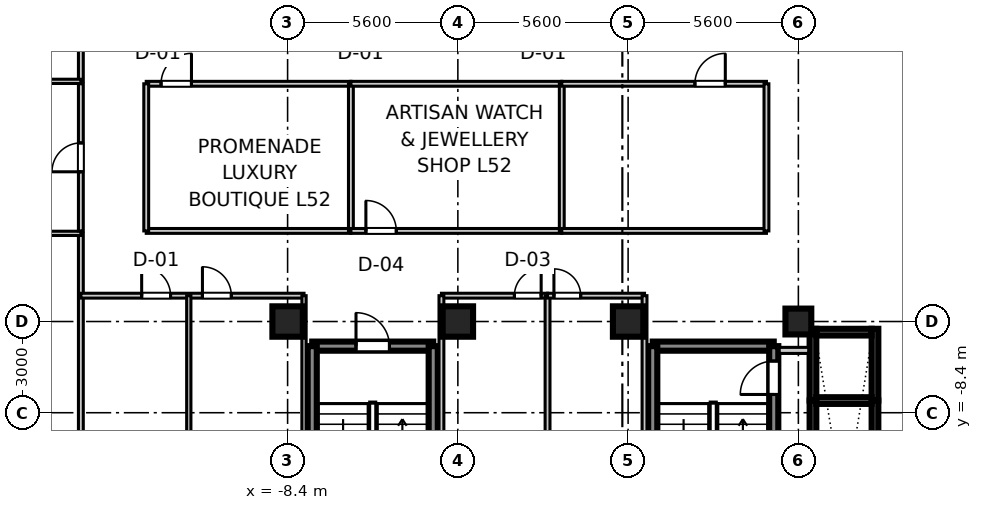
"""IFC4 building model, lengths in metres.
Left out: names, types, materials, properties, quantities, classifications, styles, units other than length and angle.
Written with IfcOpenShell. Run it as: python <this file> out.ifc"""

import sys

from ifc_helpers import new_model, si_unit, direction, frame, frame_2d, origin, origin_2d, place, context, subcontext, project, spatial, rectangle, extrude, source, transform, mapped, element, fill, save


model = new_model("IFC4")
c1 = context("Model", 3, precision=1e-05, world=origin(), true_north=direction((0.0, 1.0)))
c2 = subcontext(c1, "Body", "Model", "MODEL_VIEW")
j1 = project(units=[si_unit("LENGTHUNIT", "METRE"), si_unit("PLANEANGLEUNIT", "RADIAN")], contexts=[c1])
p1 = place(None, origin())
s1 = spatial("IfcSite", under=j1, at=p1, CompositionType="ELEMENT")
p2 = place(p1, origin())
s2 = spatial("IfcBuilding", under=s1, at=p2, CompositionType="ELEMENT")
p3 = place(p2, frame((0.0, 0.0, 204.9)))
s3 = spatial("IfcBuildingStorey", under=s2, at=p3, CompositionType="ELEMENT", Elevation=204.9)
m1 = source(origin(), c2, "Body", "SweptSolid", [
    extrude(rectangle(XDim=1.0, YDim=1.0, at=origin_2d()), origin(), (0.0, 0.0, 1.0), 3.655),
])
for number, where, z_axis, x_axis in (
    (1, (-8.4, -5.4, 0.0), (0.0, 0.0, 1.0), (1.0, 0.0, 0.0)),
    (2, (-2.8, -5.4, 0.0), (0.0, 0.0, 1.0), (1.0, 0.0, 0.0)),
    (3, (2.8, -5.4, 0.0), (0.0, 0.0, 1.0), (1.0, 0.0, 0.0)),
):
    element("IfcColumn", number, at=place(p3, frame(where, z_axis=z_axis, x_axis=x_axis)), inside=s3, PredefinedType="COLUMN", context=c2, shape_type="MappedRepresentation", body=[
        mapped(m1, transform((0.0, 0.0, 0.0), scale=1.0)),
    ])
m2 = source(origin(), c2, "Body", "SweptSolid", [
    extrude(rectangle(XDim=0.85, YDim=0.85, at=origin_2d()), origin(), (0.0, 0.0, 1.0), 3.655),
])
p4 = place(p3, frame((8.4, -5.4, 0.0), z_axis=(0.0, 0.0, 1.0), x_axis=(1.0, 0.0, 0.0)))
e4 = element("IfcColumn", 4, at=p4, inside=s3, PredefinedType="PILASTER", context=c2, shape_type="MappedRepresentation", body=[
    mapped(m2, transform((0.0, 0.0, 0.0), scale=1.0)),
])
m3 = source(origin(), c2, "Body", "SweptSolid", [
    extrude(rectangle(XDim=3.98, YDim=0.3, at=frame_2d((1.99, 0.0))), origin(), (0.0, 0.0, 1.0), 3.41),
])
p5 = place(p3, frame((3.61, -6.21, 0.0), z_axis=(0.0, 0.0, 1.0), x_axis=(1.0, 0.0, 0.0)))
e5 = element("IfcWall", 5, at=p5, inside=s3, PredefinedType="SHEAR", context=c2, shape_type="MappedRepresentation", body=[
    mapped(m3, transform((0.0, 0.0, 0.0), scale=1.0)),
])
m4 = source(origin(), c2, "Body", "SweptSolid", [
    extrude(rectangle(XDim=9.38, YDim=0.3, at=frame_2d((4.69, 0.0))), origin(), (0.0, 0.0, 1.0), 3.41),
])
p6 = place(p3, frame((3.61, -15.59, 0.0), z_axis=(0.0, 0.0, 1.0), x_axis=(0.0, 1.0, 0.0)))
e6 = element("IfcWall", 6, at=p6, inside=s3, PredefinedType="SHEAR", context=c2, shape_type="MappedRepresentation", body=[
    mapped(m4, transform((0.0, 0.0, 0.0), scale=1.0)),
])
p7 = place(p3, frame((7.59, -15.59, 0.0), z_axis=(0.0, 0.0, 1.0), x_axis=(0.0, 1.0, 0.0)))
e7 = element("IfcWall", 7, at=p7, inside=s3, PredefinedType="SHEAR", context=c2, shape_type="MappedRepresentation", body=[
    mapped(m4, transform((0.0, 0.0, 0.0), scale=1.0)),
])
p8 = place(p7, frame((7.79, 0.0, 0.0)))
e8 = element("IfcOpeningElement", 8, at=p8, cuts=e7, PredefinedType="OPENING", context=c2, shape_type="SweptSolid", body=[
    extrude(rectangle(XDim=1.1, YDim=2.15, at=frame_2d((0.55, 1.075))), frame((0.0, 0.16, 0.0), z_axis=(0.0, -1.0, 0.0), x_axis=(1.0, 0.0, 0.0)), (0.0, 0.0, 1.0), 0.32),
])
p9 = place(p3, frame((-7.59, -6.21, 0.0), z_axis=(0.0, 0.0, 1.0), x_axis=(1.0, 0.0, 0.0)))
e9 = element("IfcWall", 9, at=p9, inside=s3, PredefinedType="SHEAR", context=c2, shape_type="MappedRepresentation", body=[
    mapped(m3, transform((0.0, 0.0, 0.0), scale=1.0)),
])
p10 = place(p9, frame((1.44, 0.0, 0.0)))
e10 = element("IfcOpeningElement", 10, at=p10, cuts=e9, PredefinedType="OPENING", context=c2, shape_type="SweptSolid", body=[
    extrude(rectangle(XDim=1.1, YDim=2.15, at=frame_2d((0.55, 1.075))), frame((0.0, 0.16, 0.0), z_axis=(0.0, -1.0, 0.0), x_axis=(1.0, 0.0, 0.0)), (0.0, 0.0, 1.0), 0.32),
])
for number, where, z_axis, x_axis in (
    (11, (-7.59, -15.59, 0.0), (0.0, 0.0, 1.0), (0.0, 1.0, 0.0)),
    (12, (-3.61, -15.59, 0.0), (0.0, 0.0, 1.0), (0.0, 1.0, 0.0)),
):
    element("IfcWall", number, at=place(p3, frame(where, z_axis=z_axis, x_axis=x_axis)), inside=s3, PredefinedType="SHEAR", context=c2, shape_type="MappedRepresentation", body=[
        mapped(m4, transform((0.0, 0.0, 0.0), scale=1.0)),
    ])
m5 = source(origin(), c2, "Body", "SweptSolid", [
    extrude(rectangle(XDim=2.36, YDim=0.22, at=frame_2d((1.18, 0.0))), origin(), (0.0, 0.0, 1.0), 3.41),
])
for number, where, z_axis, x_axis in (
    (13, (8.88, -8.0, 0.0), (0.0, 0.0, 1.0), (0.0, 1.0, 0.0)),
    (14, (10.92, -8.0, 0.0), (0.0, 0.0, 1.0), (0.0, 1.0, 0.0)),
):
    element("IfcWall", number, at=place(p3, frame(where, z_axis=z_axis, x_axis=x_axis)), inside=s3, PredefinedType="SHEAR", context=c2, shape_type="MappedRepresentation", body=[
        mapped(m5, transform((0.0, 0.0, 0.0), scale=1.0)),
    ])
m6 = source(origin(), c2, "Body", "SweptSolid", [
    extrude(rectangle(XDim=1.82, YDim=0.22, at=frame_2d((0.91, 0.0))), origin(), (0.0, 0.0, 1.0), 3.41),
])
p11 = place(p3, frame((8.99, -5.75, 0.0), z_axis=(0.0, 0.0, 1.0), x_axis=(1.0, 0.0, 0.0)))
e15 = element("IfcWall", 15, at=p11, inside=s3, PredefinedType="SHEAR", context=c2, shape_type="MappedRepresentation", body=[
    mapped(m6, transform((0.0, 0.0, 0.0), scale=1.0)),
])
m7 = source(origin(), c2, "Body", "SweptSolid", [
    extrude(rectangle(XDim=2.2, YDim=0.22, at=frame_2d((1.1, 0.0))), origin(), (0.0, 0.0, 1.0), 3.41),
])
for number, where, z_axis, x_axis in (
    (16, (8.88, -10.2, 0.0), (0.0, 0.0, 1.0), (0.0, 1.0, 0.0)),
    (17, (10.92, -10.2, 0.0), (0.0, 0.0, 1.0), (0.0, 1.0, 0.0)),
):
    element("IfcWall", number, at=place(p3, frame(where, z_axis=z_axis, x_axis=x_axis)), inside=s3, PredefinedType="SHEAR", context=c2, shape_type="MappedRepresentation", body=[
        mapped(m7, transform((0.0, 0.0, 0.0), scale=1.0)),
    ])
m8 = source(origin(), c2, "Body", "SweptSolid", [
    extrude(rectangle(XDim=1.82, YDim=0.22, at=frame_2d((0.91, 0.0))), origin(), (0.0, 0.0, 1.0), 3.7),
])
p12 = place(p3, frame((8.99, -8.0, 0.0), z_axis=(0.0, 0.0, 1.0), x_axis=(1.0, 0.0, 0.0)))
e18 = element("IfcWall", 18, at=p12, inside=s3, PredefinedType="SHEAR", context=c2, shape_type="MappedRepresentation", body=[
    mapped(m8, transform((0.0, 0.0, 0.0), scale=1.0)),
])
m9 = source(origin(), c2, "Body", "SweptSolid", [
    extrude(rectangle(XDim=0.97, YDim=0.2, at=frame_2d((0.485, 0.0))), origin(), (0.0, 0.0, 1.0), 2.75),
])
p13 = place(p3, frame((7.77, -6.35, 0.0), z_axis=(0.0, 0.0, 1.0), x_axis=(1.0, 0.0, 0.0)))
e19 = element("IfcWall", 19, at=p13, inside=s3, PredefinedType="PARTITIONING", context=c2, shape_type="MappedRepresentation", body=[
    mapped(m9, transform((0.0, 0.0, 0.0), scale=1.0)),
])
m10 = source(origin(), c2, "Body", "SweptSolid", [
    extrude(rectangle(XDim=21.4, YDim=0.16, at=frame_2d((10.7, 0.0))), origin(), (0.0, 0.0, 1.0), 2.75),
])
p14 = place(p3, frame((-15.2, 2.5, 0.0), z_axis=(0.0, 0.0, 1.0), x_axis=(0.0, 1.0, 0.0)))
e20 = element("IfcWall", 20, at=p14, inside=s3, PredefinedType="PARTITIONING", context=c2, shape_type="MappedRepresentation", body=[
    mapped(m10, transform((0.0, 0.0, 0.0), scale=1.0)),
])
p15 = place(p14, frame((8.15, 0.0, 0.0)))
e21 = element("IfcOpeningElement", 21, at=p15, cuts=e20, PredefinedType="OPENING", context=c2, shape_type="SweptSolid", body=[
    extrude(rectangle(XDim=0.95, YDim=2.1, at=frame_2d((0.475, 1.05))), frame((0.0, 0.09, 0.0), z_axis=(0.0, -1.0, 0.0), x_axis=(1.0, 0.0, 0.0)), (0.0, 0.0, 1.0), 0.18),
])
m11 = source(origin(), c2, "Body", "SweptSolid", [
    extrude(rectangle(XDim=5.96, YDim=0.14, at=frame_2d((2.98, 0.0))), origin(), (0.0, 0.0, 1.0), 2.75),
])
p16 = place(p3, frame((-21.16, 2.5, 0.0), z_axis=(0.0, 0.0, 1.0), x_axis=(1.0, 0.0, 0.0)))
e22 = element("IfcWall", 22, at=p16, inside=s3, PredefinedType="PARTITIONING", context=c2, shape_type="MappedRepresentation", body=[
    mapped(m11, transform((0.0, 0.0, 0.0), scale=1.0)),
])
p17 = place(p3, frame((-15.2, -23.9, 0.0), z_axis=(0.0, 0.0, 1.0), x_axis=(0.0, 1.0, 0.0)))
e23 = element("IfcWall", 23, at=p17, inside=s3, PredefinedType="PARTITIONING", context=c2, shape_type="MappedRepresentation", body=[
    mapped(m10, transform((0.0, 0.0, 0.0), scale=1.0)),
])
p18 = place(p17, frame((12.3, 0.0, 0.0)))
e24 = element("IfcOpeningElement", 24, at=p18, cuts=e23, PredefinedType="OPENING", context=c2, shape_type="SweptSolid", body=[
    extrude(rectangle(XDim=0.95, YDim=2.1, at=frame_2d((0.475, 1.05))), frame((0.0, 0.09, 0.0), z_axis=(0.0, -1.0, 0.0), x_axis=(1.0, 0.0, 0.0)), (0.0, 0.0, 1.0), 0.18),
])
p19 = place(p3, frame((-21.16, -2.5, 0.0), z_axis=(0.0, 0.0, 1.0), x_axis=(1.0, 0.0, 0.0)))
e25 = element("IfcWall", 25, at=p19, inside=s3, PredefinedType="PARTITIONING", context=c2, shape_type="MappedRepresentation", body=[
    mapped(m11, transform((0.0, 0.0, 0.0), scale=1.0)),
])
m12 = source(origin(), c2, "Body", "SweptSolid", [
    extrude(rectangle(XDim=7.34, YDim=0.16, at=frame_2d((3.67, 0.0))), origin(), (0.0, 0.0, 1.0), 2.75),
])
p20 = place(p3, frame((-15.2, -4.55, 0.0), z_axis=(0.0, 0.0, 1.0), x_axis=(1.0, 0.0, 0.0)))
e26 = element("IfcWall", 26, at=p20, inside=s3, PredefinedType="PARTITIONING", context=c2, shape_type="MappedRepresentation", body=[
    mapped(m12, transform((0.0, 0.0, 0.0), scale=1.0)),
])
p21 = place(p20, frame((2.0, 0.0, 0.0)))
e27 = element("IfcOpeningElement", 27, at=p21, cuts=e26, PredefinedType="OPENING", context=c2, shape_type="SweptSolid", body=[
    extrude(rectangle(XDim=0.95, YDim=2.1, at=frame_2d((0.475, 1.05))), frame((0.0, 0.09, 0.0), z_axis=(0.0, -1.0, 0.0), x_axis=(1.0, 0.0, 0.0)), (0.0, 0.0, 1.0), 0.18),
])
p22 = place(p20, frame((3.999, 0.0, 0.0)))
e28 = element("IfcOpeningElement", 28, at=p22, cuts=e26, PredefinedType="OPENING", context=c2, shape_type="SweptSolid", body=[
    extrude(rectangle(XDim=0.95, YDim=2.1, at=frame_2d((0.475, 1.05))), frame((0.0, 0.09, 0.0), z_axis=(0.0, -1.0, 0.0), x_axis=(1.0, 0.0, 0.0)), (0.0, 0.0, 1.0), 0.18),
])
m13 = source(origin(), c2, "Body", "SweptSolid", [
    extrude(rectangle(XDim=19.35, YDim=0.14, at=frame_2d((9.675, 0.0))), origin(), (0.0, 0.0, 1.0), 2.75),
])
for number, where, z_axis, x_axis in (
    (29, (-7.86, -23.9, 0.0), (0.0, 0.0, 1.0), (0.0, 1.0, 0.0)),
    (30, (-11.65, -23.9, 0.0), (0.0, 0.0, 1.0), (0.0, 1.0, 0.0)),
):
    element("IfcWall", number, at=place(p3, frame(where, z_axis=z_axis, x_axis=x_axis)), inside=s3, PredefinedType="PARTITIONING", context=c2, shape_type="MappedRepresentation", body=[
        mapped(m13, transform((0.0, 0.0, 0.0), scale=1.0)),
    ])
m14 = source(origin(), c2, "Body", "SweptSolid", [
    extrude(rectangle(XDim=3.49, YDim=0.16, at=frame_2d((1.745, 0.0))), origin(), (0.0, 0.0, 1.0), 2.75),
])
p23 = place(p3, frame((-3.34, -4.55, 0.0), z_axis=(0.0, 0.0, 1.0), x_axis=(1.0, 0.0, 0.0)))
e31 = element("IfcWall", 31, at=p23, inside=s3, PredefinedType="PARTITIONING", context=c2, shape_type="MappedRepresentation", body=[
    mapped(m14, transform((0.0, 0.0, 0.0), scale=1.0)),
])
p24 = place(p23, frame((2.4, 0.0, 0.0)))
e32 = element("IfcOpeningElement", 32, at=p24, cuts=e31, PredefinedType="OPENING", context=c2, shape_type="SweptSolid", body=[
    extrude(rectangle(XDim=0.88, YDim=2.1, at=frame_2d((0.44, 1.05))), frame((0.0, 0.09, 0.0), z_axis=(0.0, -1.0, 0.0), x_axis=(1.0, 0.0, 0.0)), (0.0, 0.0, 1.0), 0.18),
])
m15 = source(origin(), c2, "Body", "SweptSolid", [
    extrude(rectangle(XDim=19.35, YDim=0.16, at=frame_2d((9.675, 0.0))), origin(), (0.0, 0.0, 1.0), 2.75),
])
for number, where, z_axis, x_axis in (
    (33, (-3.34, -23.9, 0.0), (0.0, 0.0, 1.0), (0.0, 1.0, 0.0)),
    (34, (0.15, -23.9, 0.0), (0.0, 0.0, 1.0), (0.0, 1.0, 0.0)),
):
    element("IfcWall", number, at=place(p3, frame(where, z_axis=z_axis, x_axis=x_axis)), inside=s3, PredefinedType="PARTITIONING", context=c2, shape_type="MappedRepresentation", body=[
        mapped(m15, transform((0.0, 0.0, 0.0), scale=1.0)),
    ])
m16 = source(origin(), c2, "Body", "SweptSolid", [
    extrude(rectangle(XDim=3.19, YDim=0.16, at=frame_2d((1.595, 0.0))), origin(), (0.0, 0.0, 1.0), 2.75),
])
p25 = place(p3, frame((0.15, -4.55, 0.0), z_axis=(0.0, 0.0, 1.0), x_axis=(1.0, 0.0, 0.0)))
e35 = element("IfcWall", 35, at=p25, inside=s3, PredefinedType="PARTITIONING", context=c2, shape_type="MappedRepresentation", body=[
    mapped(m16, transform((0.0, 0.0, 0.0), scale=1.0)),
])
p26 = place(p25, frame((0.21, 0.0, 0.0)))
e36 = element("IfcOpeningElement", 36, at=p26, cuts=e35, PredefinedType="OPENING", context=c2, shape_type="SweptSolid", body=[
    extrude(rectangle(XDim=0.88, YDim=2.1, at=frame_2d((0.44, 1.05))), frame((0.0, 0.09, 0.0), z_axis=(0.0, -1.0, 0.0), x_axis=(1.0, 0.0, 0.0)), (0.0, 0.0, 1.0), 0.18),
])
p27 = place(p3, frame((3.34, -23.9, 0.0), z_axis=(0.0, 0.0, 1.0), x_axis=(0.0, 1.0, 0.0)))
e37 = element("IfcWall", 37, at=p27, inside=s3, PredefinedType="PARTITIONING", context=c2, shape_type="MappedRepresentation", body=[
    mapped(m15, transform((0.0, 0.0, 0.0), scale=1.0)),
])
m17 = source(origin(), c2, "Body", "SweptSolid", [
    extrude(rectangle(XDim=4.84, YDim=0.16, at=frame_2d((2.42, 0.0))), origin(), (0.0, 0.0, 1.0), 2.75),
])
p28 = place(p3, frame((-15.2, -2.42, 0.0), z_axis=(0.0, 0.0, 1.0), x_axis=(0.0, 1.0, 0.0)))
e38 = element("IfcWall", 38, at=p28, inside=s3, PredefinedType="PARTITIONING", context=c2, shape_type="MappedRepresentation", body=[
    mapped(m17, transform((0.0, 0.0, 0.0), scale=1.0)),
])
p29 = place(p28, frame((1.945, 0.0, 0.0)))
e39 = element("IfcOpeningElement", 39, at=p29, cuts=e38, PredefinedType="OPENING", context=c2, shape_type="SweptSolid", body=[
    extrude(rectangle(XDim=0.95, YDim=2.1, at=frame_2d((0.475, 1.05))), frame((0.0, 0.09, 0.0), z_axis=(0.0, -1.0, 0.0), x_axis=(1.0, 0.0, 0.0)), (0.0, 0.0, 1.0), 0.18),
])
m18 = source(origin(), c2, "Body", "SweptSolid", [
    extrude(rectangle(XDim=6.732, YDim=0.16, at=frame_2d((3.366, 0.0))), origin(), (0.0, 0.0, 1.0), 2.75),
])
p30 = place(p3, frame((-13.05, -2.42, 0.0), z_axis=(0.0, 0.0, 1.0), x_axis=(1.0, 0.0, 0.0)))
e40 = element("IfcWall", 40, at=p30, inside=s3, PredefinedType="PARTITIONING", context=c2, shape_type="MappedRepresentation", body=[
    mapped(m18, transform((0.0, 0.0, 0.0), scale=1.0)),
])
p31 = place(p3, frame((-13.05, 2.42, 0.0), z_axis=(0.0, 0.0, 1.0), x_axis=(1.0, 0.0, 0.0)))
e41 = element("IfcWall", 41, at=p31, inside=s3, PredefinedType="PARTITIONING", context=c2, shape_type="MappedRepresentation", body=[
    mapped(m18, transform((0.0, 0.0, 0.0), scale=1.0)),
])
p32 = place(p31, frame((0.488, 0.0, 0.0)))
e42 = element("IfcOpeningElement", 42, at=p32, cuts=e41, PredefinedType="OPENING", context=c2, shape_type="SweptSolid", body=[
    extrude(rectangle(XDim=1.0, YDim=2.1, at=frame_2d((0.5, 1.05))), frame((0.0, 0.09, 0.0), z_axis=(0.0, -1.0, 0.0), x_axis=(1.0, 0.0, 0.0)), (0.0, 0.0, 1.0), 0.18),
])
for number, where, z_axis, x_axis in (
    (43, (-13.05, -2.42, 0.0), (0.0, 0.0, 1.0), (0.0, 1.0, 0.0)),
    (44, (-6.318, -2.42, 0.0), (0.0, 0.0, 1.0), (0.0, 1.0, 0.0)),
):
    element("IfcWall", number, at=place(p3, frame(where, z_axis=z_axis, x_axis=x_axis)), inside=s3, PredefinedType="PARTITIONING", context=c2, shape_type="MappedRepresentation", body=[
        mapped(m17, transform((0.0, 0.0, 0.0), scale=1.0)),
    ])
m19 = source(origin(), c2, "Body", "SweptSolid", [
    extrude(rectangle(XDim=6.936, YDim=0.16, at=frame_2d((3.468, 0.0))), origin(), (0.0, 0.0, 1.0), 2.75),
])
p33 = place(p3, frame((-6.318, -2.42, 0.0), z_axis=(0.0, 0.0, 1.0), x_axis=(1.0, 0.0, 0.0)))
e45 = element("IfcWall", 45, at=p33, inside=s3, PredefinedType="PARTITIONING", context=c2, shape_type="MappedRepresentation", body=[
    mapped(m19, transform((0.0, 0.0, 0.0), scale=1.0)),
])
p34 = place(p33, frame((0.493, 0.0, 0.0)))
e46 = element("IfcOpeningElement", 46, at=p34, cuts=e45, PredefinedType="OPENING", context=c2, shape_type="SweptSolid", body=[
    extrude(rectangle(XDim=1.0, YDim=2.1, at=frame_2d((0.5, 1.05))), frame((0.0, 0.09, 0.0), z_axis=(0.0, -1.0, 0.0), x_axis=(1.0, 0.0, 0.0)), (0.0, 0.0, 1.0), 0.18),
])
p35 = place(p3, frame((-6.318, 2.42, 0.0), z_axis=(0.0, 0.0, 1.0), x_axis=(1.0, 0.0, 0.0)))
e47 = element("IfcWall", 47, at=p35, inside=s3, PredefinedType="PARTITIONING", context=c2, shape_type="MappedRepresentation", body=[
    mapped(m19, transform((0.0, 0.0, 0.0), scale=1.0)),
])
p36 = place(p3, frame((0.618, -2.42, 0.0), z_axis=(0.0, 0.0, 1.0), x_axis=(0.0, 1.0, 0.0)))
e48 = element("IfcWall", 48, at=p36, inside=s3, PredefinedType="PARTITIONING", context=c2, shape_type="MappedRepresentation", body=[
    mapped(m17, transform((0.0, 0.0, 0.0), scale=1.0)),
])
m20 = source(origin(), c2, "Body", "SweptSolid", [
    extrude(rectangle(XDim=6.732, YDim=0.16, at=frame_2d((3.366, 0.0))), origin(), (0.0, 0.0, 1.0), 2.75),
])
p37 = place(p3, frame((0.618, -2.42, 0.0), z_axis=(0.0, 0.0, 1.0), x_axis=(1.0, 0.0, 0.0)))
e49 = element("IfcWall", 49, at=p37, inside=s3, PredefinedType="PARTITIONING", context=c2, shape_type="MappedRepresentation", body=[
    mapped(m20, transform((0.0, 0.0, 0.0), scale=1.0)),
])
p38 = place(p3, frame((0.618, 2.42, 0.0), z_axis=(0.0, 0.0, 1.0), x_axis=(1.0, 0.0, 0.0)))
e50 = element("IfcWall", 50, at=p38, inside=s3, PredefinedType="PARTITIONING", context=c2, shape_type="MappedRepresentation", body=[
    mapped(m20, transform((0.0, 0.0, 0.0), scale=1.0)),
])
p39 = place(p38, frame((4.379, 0.0, 0.0)))
e51 = element("IfcOpeningElement", 51, at=p39, cuts=e50, PredefinedType="OPENING", context=c2, shape_type="SweptSolid", body=[
    extrude(rectangle(XDim=1.0, YDim=2.1, at=frame_2d((0.5, 1.05))), frame((0.0, 0.09, 0.0), z_axis=(0.0, -1.0, 0.0), x_axis=(1.0, 0.0, 0.0)), (0.0, 0.0, 1.0), 0.18),
])
p40 = place(p3, frame((7.35, -2.42, 0.0), z_axis=(0.0, 0.0, 1.0), x_axis=(0.0, 1.0, 0.0)))
e52 = element("IfcWall", 52, at=p40, inside=s3, PredefinedType="PARTITIONING", context=c2, shape_type="MappedRepresentation", body=[
    mapped(m17, transform((0.0, 0.0, 0.0), scale=1.0)),
])
m21 = source(origin(), c2, "Body", "SweptSolid", [
    extrude(rectangle(XDim=1.1, YDim=2.15, at=frame_2d((0.55, 1.075))), frame((0.0, 0.025, 0.0), z_axis=(0.0, -1.0, 0.0), x_axis=(1.0, 0.0, 0.0)), (0.0, 0.0, 1.0), 0.05),
])
p41 = place(p8, origin())
e53 = element("IfcDoor", 53, at=p41, inside=s3, OperationType="SINGLE_SWING_LEFT", PredefinedType="DOOR", context=c2, shape_type="MappedRepresentation", body=[
    mapped(m21, transform((0.0, 0.0, 0.0), scale=1.0)),
])
fill(e8, e53)
p42 = place(p10, frame((1.1, 0.0, 0.0), z_axis=(0.0, 0.0, 1.0), x_axis=(-1.0, 0.0, 0.0)))
e54 = element("IfcDoor", 54, at=p42, inside=s3, OperationType="SINGLE_SWING_LEFT", PredefinedType="DOOR", context=c2, shape_type="MappedRepresentation", body=[
    mapped(m21, transform((0.0, 0.0, 0.0), scale=1.0)),
])
fill(e10, e54)
m22 = source(origin(), c2, "Body", "SweptSolid", [
    extrude(rectangle(XDim=0.95, YDim=2.1, at=frame_2d((0.475, 1.05))), frame((0.0, 0.025, 0.0), z_axis=(0.0, -1.0, 0.0), x_axis=(1.0, 0.0, 0.0)), (0.0, 0.0, 1.0), 0.05),
])
p43 = place(p21, frame((0.95, 0.0, 0.0), z_axis=(0.0, 0.0, 1.0), x_axis=(-1.0, 0.0, 0.0)))
e55 = element("IfcDoor", 55, at=p43, inside=s3, OperationType="SINGLE_SWING_LEFT", PredefinedType="DOOR", context=c2, shape_type="MappedRepresentation", body=[
    mapped(m22, transform((0.0, 0.0, 0.0), scale=1.0)),
])
fill(e27, e55)
p44 = place(p22, frame((0.95, 0.0, 0.0), z_axis=(0.0, 0.0, 1.0), x_axis=(-1.0, 0.0, 0.0)))
e56 = element("IfcDoor", 56, at=p44, inside=s3, OperationType="SINGLE_SWING_LEFT", PredefinedType="DOOR", context=c2, shape_type="MappedRepresentation", body=[
    mapped(m22, transform((0.0, 0.0, 0.0), scale=1.0)),
])
fill(e28, e56)
m23 = source(origin(), c2, "Body", "SweptSolid", [
    extrude(rectangle(XDim=0.88, YDim=2.1, at=frame_2d((0.44, 1.05))), frame((0.0, 0.025, 0.0), z_axis=(0.0, -1.0, 0.0), x_axis=(1.0, 0.0, 0.0)), (0.0, 0.0, 1.0), 0.05),
])
p45 = place(p24, frame((0.88, 0.0, 0.0), z_axis=(0.0, 0.0, 1.0), x_axis=(-1.0, 0.0, 0.0)))
e57 = element("IfcDoor", 57, at=p45, inside=s3, OperationType="SINGLE_SWING_RIGHT", PredefinedType="DOOR", context=c2, shape_type="MappedRepresentation", body=[
    mapped(m23, transform((0.0, 0.0, 0.0), scale=1.0)),
])
fill(e32, e57)
p46 = place(p26, frame((0.88, 0.0, 0.0), z_axis=(0.0, 0.0, 1.0), x_axis=(-1.0, 0.0, 0.0)))
e58 = element("IfcDoor", 58, at=p46, inside=s3, OperationType="SINGLE_SWING_LEFT", PredefinedType="DOOR", context=c2, shape_type="MappedRepresentation", body=[
    mapped(m23, transform((0.0, 0.0, 0.0), scale=1.0)),
])
fill(e36, e58)
p47 = place(p29, origin())
e59 = element("IfcDoor", 59, at=p47, inside=s3, OperationType="SINGLE_SWING_LEFT", PredefinedType="DOOR", context=c2, shape_type="MappedRepresentation", body=[
    mapped(m22, transform((0.0, 0.0, 0.0), scale=1.0)),
])
fill(e39, e59)
m24 = source(origin(), c2, "Body", "SweptSolid", [
    extrude(rectangle(XDim=1.0, YDim=2.1, at=frame_2d((0.5, 1.05))), frame((0.0, 0.025, 0.0), z_axis=(0.0, -1.0, 0.0), x_axis=(1.0, 0.0, 0.0)), (0.0, 0.0, 1.0), 0.05),
])
p48 = place(p32, frame((1.0, 0.0, 0.0), z_axis=(0.0, 0.0, 1.0), x_axis=(-1.0, 0.0, 0.0)))
e60 = element("IfcDoor", 60, at=p48, inside=s3, OperationType="SINGLE_SWING_RIGHT", PredefinedType="DOOR", context=c2, shape_type="MappedRepresentation", body=[
    mapped(m24, transform((0.0, 0.0, 0.0), scale=1.0)),
])
fill(e42, e60)
p49 = place(p34, origin())
e61 = element("IfcDoor", 61, at=p49, inside=s3, OperationType="SINGLE_SWING_LEFT", PredefinedType="DOOR", context=c2, shape_type="MappedRepresentation", body=[
    mapped(m24, transform((0.0, 0.0, 0.0), scale=1.0)),
])
fill(e46, e61)
p50 = place(p39, frame((1.0, 0.0, 0.0), z_axis=(0.0, 0.0, 1.0), x_axis=(-1.0, 0.0, 0.0)))
e62 = element("IfcDoor", 62, at=p50, inside=s3, OperationType="SINGLE_SWING_RIGHT", PredefinedType="DOOR", context=c2, shape_type="MappedRepresentation", body=[
    mapped(m24, transform((0.0, 0.0, 0.0), scale=1.0)),
])
fill(e51, e62)
save(model, sys.argv[1])
